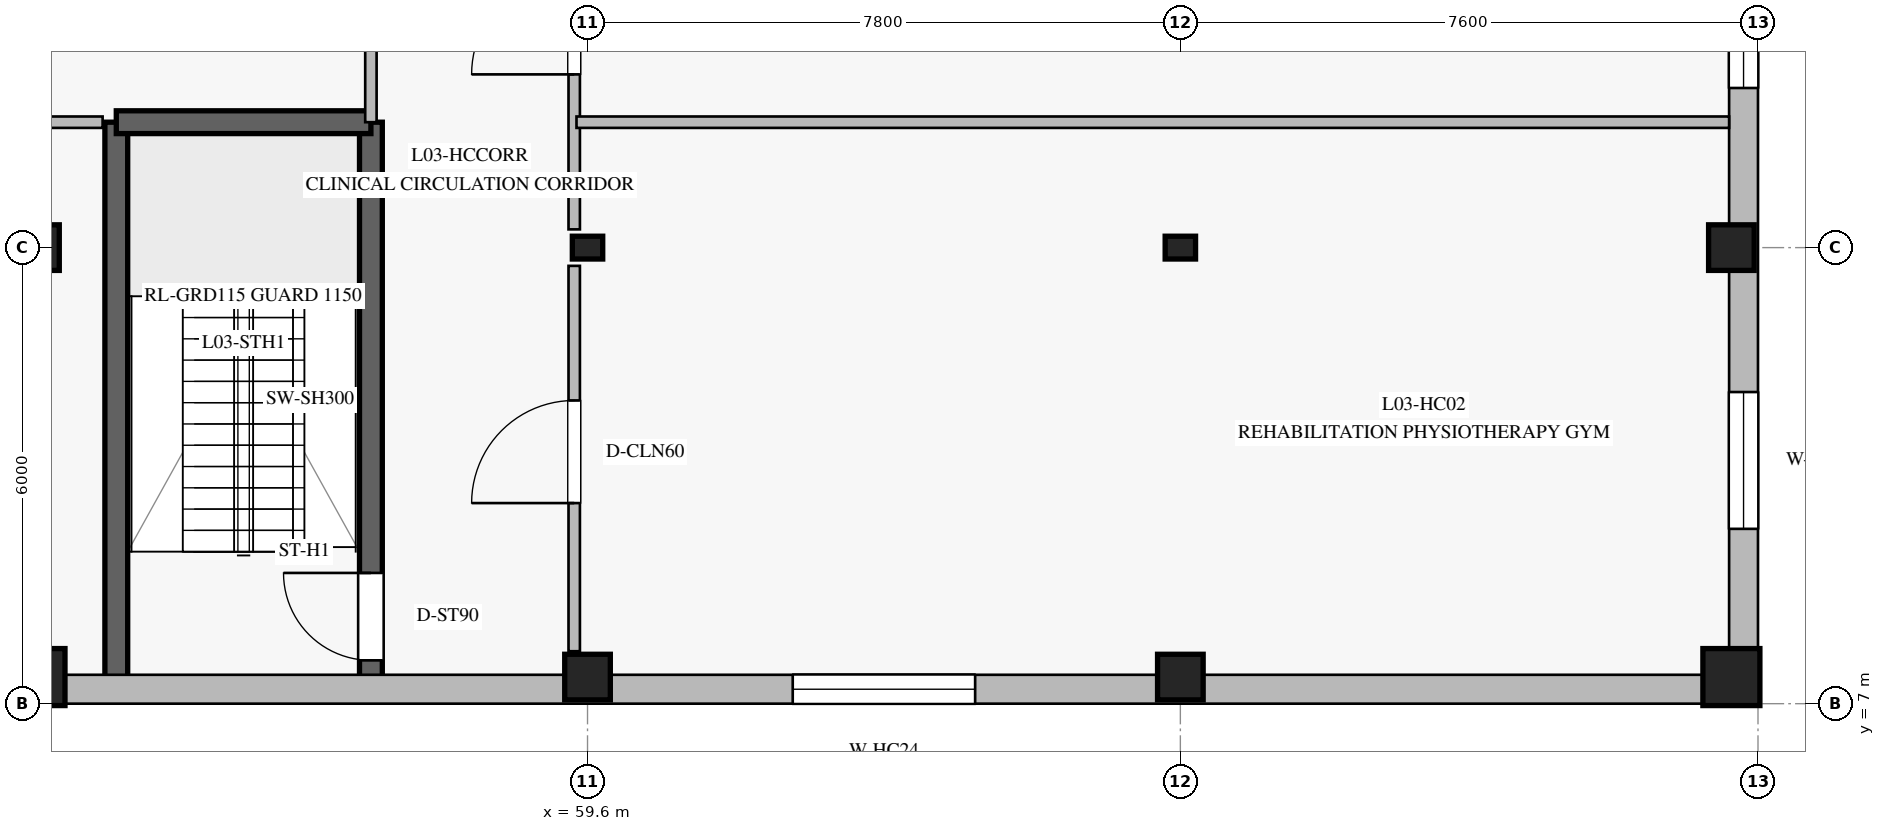
"""IFC4 building model, lengths in metres.
Left out: names, types, materials, properties, quantities, classifications, styles, units other than length and angle.
Written with IfcOpenShell. Run it as: python <this file> out.ifc"""

import sys

from ifc_helpers import new_model, si_unit, direction, frame, frame_2d, origin, origin_2d, place, context, subcontext, project, spatial, rectangle, i_section, extrude, element, fill, save


model = new_model("IFC4")
c1 = context("Model", 3, precision=1e-05, world=origin(), true_north=direction((0.0, 1.0)))
c2 = subcontext(c1, "Body", "Model", "MODEL_VIEW")
j1 = project(units=[si_unit("LENGTHUNIT", "METRE"), si_unit("PLANEANGLEUNIT", "RADIAN")], contexts=[c1])
p1 = place(None, origin())
s1 = spatial("IfcSite", under=j1, at=p1, CompositionType="ELEMENT")
p2 = place(p1, origin())
s2 = spatial("IfcBuilding", under=s1, at=p2, CompositionType="ELEMENT")
p3 = place(p2, frame((0.0, 0.0, 14.4)))
s3 = spatial("IfcBuildingStorey", under=s2, at=p3, CompositionType="ELEMENT", Elevation=14.4)
p4 = place(p3, frame((56.75, 7.35, 0.0), z_axis=(0.0, 0.0, 1.0), x_axis=(0.0, 1.0, 0.0)))
e1 = element("IfcWall", 1, at=p4, inside=s3, PredefinedType="SOLIDWALL", context=c2, shape_type="SweptSolid", body=[
    extrude(rectangle(XDim=7.3, YDim=0.3, at=frame_2d((3.65, 0.0))), origin(), (0.0, 0.0, 1.0), 4.3),
])
p5 = place(p4, frame((0.22, 0.0, 0.0)))
e2 = element("IfcOpeningElement", 2, at=p5, cuts=e1, PredefinedType="OPENING", context=c2, shape_type="SweptSolid", body=[
    extrude(rectangle(XDim=1.15, YDim=2.2, at=frame_2d((0.575, 1.1))), frame((0.0, 0.16, 0.0), z_axis=(0.0, -1.0, 0.0), x_axis=(1.0, 0.0, 0.0)), (0.0, 0.0, 1.0), 0.32),
])
p6 = place(p3, frame((53.4, 7.35, 0.0), z_axis=(0.0, 0.0, 1.0), x_axis=(0.0, 1.0, 0.0)))
e3 = element("IfcWall", 3, at=p6, inside=s3, PredefinedType="SOLIDWALL", context=c2, shape_type="SweptSolid", body=[
    extrude(rectangle(XDim=7.3, YDim=0.3, at=frame_2d((3.65, 0.0))), origin(), (0.0, 0.0, 1.0), 4.3),
])
p7 = place(p3, frame((53.4, 14.65, 0.0), z_axis=(0.0, 0.0, 1.0), x_axis=(1.0, 0.0, 0.0)))
e4 = element("IfcWall", 4, at=p7, inside=s3, PredefinedType="SOLIDWALL", context=c2, shape_type="SweptSolid", body=[
    extrude(rectangle(XDim=3.35, YDim=0.3, at=frame_2d((1.675, 0.0))), origin(), (0.0, 0.0, 1.0), 4.3),
])
p8 = place(p3, frame((52.35, 7.35, 0.0), z_axis=(0.0, 0.0, 1.0), x_axis=(1.0, 0.0, 0.0)))
e5 = element("IfcColumn", 5, at=p8, inside=s3, PredefinedType="COLUMN", context=c2, shape_type="SweptSolid", body=[
    extrude(rectangle(XDim=0.75, YDim=0.75, at=origin_2d()), origin(), (0.0, 0.0, 1.0), 4.6),
])
for number, where, z_axis, x_axis in (
    (6, (52.35, 13.0, 0.0), (0.0, 0.0, 1.0), (1.0, 0.0, 0.0)),
    (7, (59.6, 7.35, 0.0), (0.0, 0.0, 1.0), (1.0, 0.0, 0.0)),
):
    element("IfcColumn", number, at=place(p3, frame(where, z_axis=z_axis, x_axis=x_axis)), inside=s3, PredefinedType="COLUMN", context=c2, shape_type="SweptSolid", body=[
        extrude(rectangle(XDim=0.6, YDim=0.6, at=origin_2d()), origin(), (0.0, 0.0, 1.0), 4.6),
    ])
p9 = place(p3, frame((59.6, 13.0, 0.0), z_axis=(0.0, 0.0, 1.0), x_axis=(1.0, 0.0, 0.0)))
e8 = element("IfcColumn", 8, at=p9, inside=s3, PredefinedType="COLUMN", context=c2, shape_type="SweptSolid", body=[
    extrude(i_section(OverallWidth=0.3, OverallDepth=0.4, WebThickness=0.013, FlangeThickness=0.024, at=origin_2d()), origin(), (0.0, 0.0, 1.0), 4.6),
])
p10 = place(p3, frame((67.4, 7.35, 0.0), z_axis=(0.0, 0.0, 1.0), x_axis=(1.0, 0.0, 0.0)))
e9 = element("IfcColumn", 9, at=p10, inside=s3, PredefinedType="COLUMN", context=c2, shape_type="SweptSolid", body=[
    extrude(rectangle(XDim=0.6, YDim=0.6, at=origin_2d()), origin(), (0.0, 0.0, 1.0), 4.6),
])
p11 = place(p3, frame((67.4, 13.0, 0.0), z_axis=(0.0, 0.0, 1.0), x_axis=(1.0, 0.0, 0.0)))
e10 = element("IfcColumn", 10, at=p11, inside=s3, PredefinedType="COLUMN", context=c2, shape_type="SweptSolid", body=[
    extrude(i_section(OverallWidth=0.3, OverallDepth=0.4, WebThickness=0.013, FlangeThickness=0.024, at=origin_2d()), origin(), (0.0, 0.0, 1.0), 4.6),
])
p12 = place(p3, frame((74.65, 7.35, 0.0), z_axis=(0.0, 0.0, 1.0), x_axis=(1.0, 0.0, 0.0)))
e11 = element("IfcColumn", 11, at=p12, inside=s3, PredefinedType="COLUMN", context=c2, shape_type="SweptSolid", body=[
    extrude(rectangle(XDim=0.75, YDim=0.75, at=origin_2d()), origin(), (0.0, 0.0, 1.0), 4.6),
])
p13 = place(p3, frame((74.65, 13.0, 0.0), z_axis=(0.0, 0.0, 1.0), x_axis=(1.0, 0.0, 0.0)))
e12 = element("IfcColumn", 12, at=p13, inside=s3, PredefinedType="COLUMN", context=c2, shape_type="SweptSolid", body=[
    extrude(rectangle(XDim=0.6, YDim=0.6, at=origin_2d()), origin(), (0.0, 0.0, 1.0), 4.6),
])
p14 = place(p3, frame((75.0, 7.19, 0.0), z_axis=(0.0, 0.0, 1.0), x_axis=(-1.0, 0.0, 0.0)))
e13 = element("IfcWall", 13, at=p14, inside=s3, PredefinedType="STANDARD", context=c2, shape_type="SweptSolid", body=[
    extrude(rectangle(XDim=23.0, YDim=0.38, at=frame_2d((11.5, 0.0))), origin(), (0.0, 0.0, 1.0), 4.3),
])
p15 = place(p14, frame((10.3, 0.0, 0.95)))
e14 = element("IfcOpeningElement", 14, at=p15, cuts=e13, PredefinedType="OPENING", context=c2, shape_type="SweptSolid", body=[
    extrude(rectangle(XDim=2.4, YDim=1.8, at=frame_2d((1.2, 0.9))), frame((0.0, 0.2, 0.0), z_axis=(0.0, -1.0, 0.0), x_axis=(1.0, 0.0, 0.0)), (0.0, 0.0, 1.0), 0.4),
])
p16 = place(p3, frame((74.81, 42.62, 0.0), z_axis=(0.0, 0.0, 1.0), x_axis=(0.0, -1.0, 0.0)))
e15 = element("IfcWall", 15, at=p16, inside=s3, PredefinedType="STANDARD", context=c2, shape_type="SweptSolid", body=[
    extrude(rectangle(XDim=35.24, YDim=0.38, at=frame_2d((17.62, 0.0))), origin(), (0.0, 0.0, 1.0), 4.3),
])
p17 = place(p16, frame((31.52, 0.0, 0.9)))
e16 = element("IfcOpeningElement", 16, at=p17, cuts=e15, PredefinedType="OPENING", context=c2, shape_type="SweptSolid", body=[
    extrude(rectangle(XDim=1.8, YDim=1.8, at=frame_2d((0.9, 0.9))), frame((0.0, 0.2, 0.0), z_axis=(0.0, -1.0, 0.0), x_axis=(1.0, 0.0, 0.0)), (0.0, 0.0, 1.0), 0.4),
])
p18 = place(p16, frame((25.72, 0.0, 0.9)))
e17 = element("IfcOpeningElement", 17, at=p18, cuts=e15, PredefinedType="OPENING", context=c2, shape_type="SweptSolid", body=[
    extrude(rectangle(XDim=1.8, YDim=1.8, at=frame_2d((0.9, 0.9))), frame((0.0, 0.2, 0.0), z_axis=(0.0, -1.0, 0.0), x_axis=(1.0, 0.0, 0.0)), (0.0, 0.0, 1.0), 0.4),
])
p19 = place(p16, frame((19.72, 0.0, 0.9)))
e18 = element("IfcOpeningElement", 18, at=p19, cuts=e15, PredefinedType="OPENING", context=c2, shape_type="SweptSolid", body=[
    extrude(rectangle(XDim=1.8, YDim=1.8, at=frame_2d((0.9, 0.9))), frame((0.0, 0.2, 0.0), z_axis=(0.0, -1.0, 0.0), x_axis=(1.0, 0.0, 0.0)), (0.0, 0.0, 1.0), 0.4),
])
p20 = place(p16, frame((13.72, 0.0, 0.9)))
e19 = element("IfcOpeningElement", 19, at=p20, cuts=e15, PredefinedType="OPENING", context=c2, shape_type="SweptSolid", body=[
    extrude(rectangle(XDim=1.8, YDim=1.8, at=frame_2d((0.9, 0.9))), frame((0.0, 0.2, 0.0), z_axis=(0.0, -1.0, 0.0), x_axis=(1.0, 0.0, 0.0)), (0.0, 0.0, 1.0), 0.4),
])
p21 = place(p16, frame((7.72, 0.0, 0.9)))
e20 = element("IfcOpeningElement", 20, at=p21, cuts=e15, PredefinedType="OPENING", context=c2, shape_type="SweptSolid", body=[
    extrude(rectangle(XDim=1.8, YDim=1.8, at=frame_2d((0.9, 0.9))), frame((0.0, 0.2, 0.0), z_axis=(0.0, -1.0, 0.0), x_axis=(1.0, 0.0, 0.0)), (0.0, 0.0, 1.0), 0.4),
])
p22 = place(p16, frame((1.92, 0.0, 0.9)))
e21 = element("IfcOpeningElement", 21, at=p22, cuts=e15, PredefinedType="OPENING", context=c2, shape_type="SweptSolid", body=[
    extrude(rectangle(XDim=1.8, YDim=1.8, at=frame_2d((0.9, 0.9))), frame((0.0, 0.2, 0.0), z_axis=(0.0, -1.0, 0.0), x_axis=(1.0, 0.0, 0.0)), (0.0, 0.0, 1.0), 0.4),
])
p23 = place(p3, frame((56.75, 14.65, 0.0), z_axis=(0.0, 0.0, 1.0), x_axis=(0.0, 1.0, 0.0)))
e22 = element("IfcWall", 22, at=p23, inside=s3, PredefinedType="PARTITIONING", context=c2, shape_type="SweptSolid", body=[
    extrude(rectangle(XDim=20.7, YDim=0.15, at=frame_2d((10.35, 0.0))), origin(), (0.0, 0.0, 1.0), 4.3),
])
p24 = place(p23, frame((9.675, 0.0, 0.0)))
e23 = element("IfcOpeningElement", 23, at=p24, cuts=e22, PredefinedType="OPENING", context=c2, shape_type="SweptSolid", body=[
    extrude(rectangle(XDim=1.35, YDim=2.2, at=frame_2d((0.675, 1.1))), frame((0.0, 0.085, 0.0), z_axis=(0.0, -1.0, 0.0), x_axis=(1.0, 0.0, 0.0)), (0.0, 0.0, 1.0), 0.17),
])
p25 = place(p3, frame((59.425, 7.69, 0.0), z_axis=(0.0, 0.0, 1.0), x_axis=(0.0, 1.0, 0.0)))
e24 = element("IfcWall", 24, at=p25, inside=s3, PredefinedType="PARTITIONING", context=c2, shape_type="SweptSolid", body=[
    extrude(rectangle(XDim=5.07, YDim=0.15, at=frame_2d((2.535, 0.0))), origin(), (0.0, 0.0, 1.0), 3.94),
])
p26 = place(p25, frame((1.949, 0.0, 0.0)))
e25 = element("IfcOpeningElement", 25, at=p26, cuts=e24, PredefinedType="OPENING", context=c2, shape_type="SweptSolid", body=[
    extrude(rectangle(XDim=1.35, YDim=2.2, at=frame_2d((0.675, 1.1))), frame((0.0, 0.085, 0.0), z_axis=(0.0, -1.0, 0.0), x_axis=(1.0, 0.0, 0.0)), (0.0, 0.0, 1.0), 0.17),
])
p27 = place(p3, frame((59.425, 13.24, 0.0), z_axis=(0.0, 0.0, 1.0), x_axis=(0.0, 1.0, 0.0)))
e26 = element("IfcWall", 26, at=p27, inside=s3, PredefinedType="PARTITIONING", context=c2, shape_type="SweptSolid", body=[
    extrude(rectangle(XDim=4.56, YDim=0.15, at=frame_2d((2.28, 0.0))), origin(), (0.0, 0.0, 1.0), 3.94),
])
p28 = place(p27, frame((2.039, 0.0, 0.0)))
e27 = element("IfcOpeningElement", 27, at=p28, cuts=e26, PredefinedType="OPENING", context=c2, shape_type="SweptSolid", body=[
    extrude(rectangle(XDim=1.35, YDim=2.2, at=frame_2d((0.675, 1.1))), frame((0.0, 0.085, 0.0), z_axis=(0.0, -1.0, 0.0), x_axis=(1.0, 0.0, 0.0)), (0.0, 0.0, 1.0), 0.17),
])
p29 = place(p3, frame((52.38, 14.65, 0.0), z_axis=(0.0, 0.0, 1.0), x_axis=(1.0, 0.0, 0.0)))
e28 = element("IfcWall", 28, at=p29, inside=s3, PredefinedType="PARTITIONING", context=c2, shape_type="SweptSolid", body=[
    extrude(rectangle(XDim=0.84, YDim=0.15, at=frame_2d((0.42, 0.0))), origin(), (0.0, 0.0, 1.0), 3.94),
])
p30 = place(p3, frame((59.455, 14.65, 0.0), z_axis=(0.0, 0.0, 1.0), x_axis=(1.0, 0.0, 0.0)))
e29 = element("IfcWall", 29, at=p30, inside=s3, PredefinedType="PARTITIONING", context=c2, shape_type="SweptSolid", body=[
    extrude(rectangle(XDim=15.165, YDim=0.15, at=frame_2d((7.583, 0.0))), origin(), (0.0, 0.0, 1.0), 3.94),
])
p31 = place(p17, origin())
e30 = element("IfcWindow", 30, at=p31, inside=s3, PartitioningType="DOUBLE_PANEL_VERTICAL", PredefinedType="WINDOW", context=c2, shape_type="SweptSolid", body=[
    extrude(rectangle(XDim=1.8, YDim=1.8, at=frame_2d((0.9, 0.9))), frame((0.0, 0.03, 0.0), z_axis=(0.0, -1.0, 0.0), x_axis=(1.0, 0.0, 0.0)), (0.0, 0.0, 1.0), 0.06),
])
fill(e16, e30)
p32 = place(p18, origin())
e31 = element("IfcWindow", 31, at=p32, inside=s3, PartitioningType="DOUBLE_PANEL_VERTICAL", PredefinedType="WINDOW", context=c2, shape_type="SweptSolid", body=[
    extrude(rectangle(XDim=1.8, YDim=1.8, at=frame_2d((0.9, 0.9))), frame((0.0, 0.03, 0.0), z_axis=(0.0, -1.0, 0.0), x_axis=(1.0, 0.0, 0.0)), (0.0, 0.0, 1.0), 0.06),
])
fill(e17, e31)
p33 = place(p15, origin())
e32 = element("IfcWindow", 32, at=p33, inside=s3, PartitioningType="TRIPLE_PANEL_VERTICAL", PredefinedType="WINDOW", context=c2, shape_type="SweptSolid", body=[
    extrude(rectangle(XDim=2.4, YDim=1.8, at=frame_2d((1.2, 0.9))), frame((0.0, 0.03, 0.0), z_axis=(0.0, -1.0, 0.0), x_axis=(1.0, 0.0, 0.0)), (0.0, 0.0, 1.0), 0.06),
])
fill(e14, e32)
p34 = place(p5, origin())
e33 = element("IfcDoor", 33, at=p34, inside=s3, OperationType="SINGLE_SWING_RIGHT", PredefinedType="DOOR", context=c2, shape_type="SweptSolid", body=[
    extrude(rectangle(XDim=1.15, YDim=2.2, at=frame_2d((0.575, 1.1))), frame((0.0, 0.025, 0.0), z_axis=(0.0, -1.0, 0.0), x_axis=(1.0, 0.0, 0.0)), (0.0, 0.0, 1.0), 0.05),
])
fill(e2, e33)
p35 = place(p26, origin())
e34 = element("IfcDoor", 34, at=p35, inside=s3, OperationType="SINGLE_SWING_LEFT", PredefinedType="DOOR", context=c2, shape_type="SweptSolid", body=[
    extrude(rectangle(XDim=1.35, YDim=2.2, at=frame_2d((0.675, 1.1))), frame((0.0, 0.025, 0.0), z_axis=(0.0, -1.0, 0.0), x_axis=(1.0, 0.0, 0.0)), (0.0, 0.0, 1.0), 0.05),
])
fill(e25, e34)
p36 = place(p28, origin())
e35 = element("IfcDoor", 35, at=p36, inside=s3, OperationType="SINGLE_SWING_LEFT", PredefinedType="DOOR", context=c2, shape_type="SweptSolid", body=[
    extrude(rectangle(XDim=1.35, YDim=2.2, at=frame_2d((0.675, 1.1))), frame((0.0, 0.025, 0.0), z_axis=(0.0, -1.0, 0.0), x_axis=(1.0, 0.0, 0.0)), (0.0, 0.0, 1.0), 0.05),
])
fill(e27, e35)
save(model, sys.argv[1])
